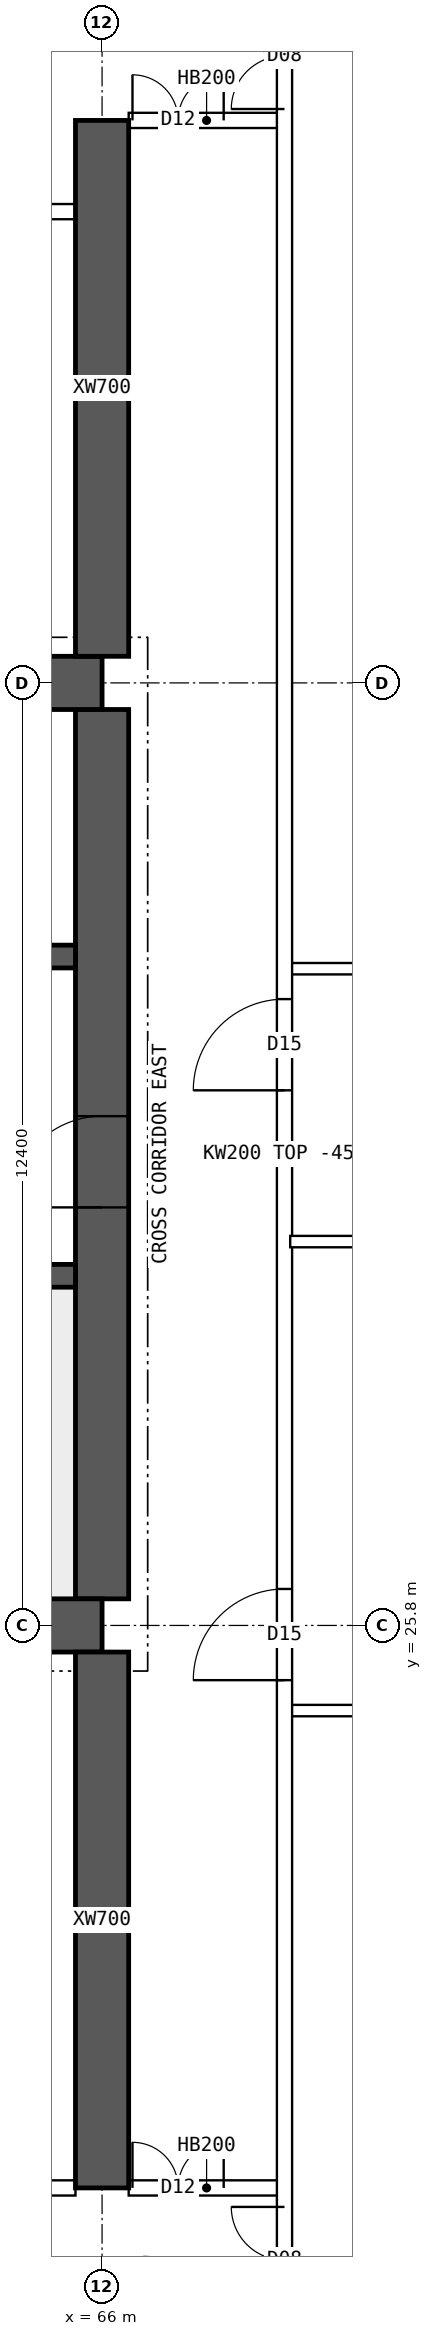
"""IFC4 building model, lengths in metres.
Left out: names, types, materials, properties, quantities, classifications, styles, units other than length and angle.
Written with IfcOpenShell. Run it as: python <this file> out.ifc"""

import sys

from ifc_helpers import new_model, si_unit, direction, frame, frame_2d, origin, place, context, subcontext, project, spatial, polyline, rectangle, outline, extrude, element, fill, save


model = new_model("IFC4")
c1 = context("Model", 3, precision=1e-05, world=origin(), true_north=direction((0.0, 1.0)))
c2 = subcontext(c1, "Body", "Model", "MODEL_VIEW")
j1 = project(units=[si_unit("LENGTHUNIT", "METRE"), si_unit("PLANEANGLEUNIT", "RADIAN")], contexts=[c1])
p1 = place(None, origin())
s1 = spatial("IfcSite", under=j1, at=p1, CompositionType="ELEMENT")
p2 = place(p1, origin())
s2 = spatial("IfcBuilding", under=s1, at=p2, CompositionType="ELEMENT")
p3 = place(p2, frame((0.0, 0.0, 227.8)))
s3 = spatial("IfcBuildingStorey", under=s2, at=p3, CompositionType="ELEMENT", Elevation=227.8)
for number, where, z_axis, x_axis in (
    (1, (18.0, 25.8, 0.0), (0.0, 0.0, 1.0), (1.0, 0.0, 0.0)),
    (2, (18.0, 38.2, 0.0), (0.0, 0.0, 1.0), (1.0, 0.0, 0.0)),
):
    element("IfcWall", number, at=place(p3, frame(where, z_axis=z_axis, x_axis=x_axis)), inside=s3, PredefinedType="SHEAR", context=c2, shape_type="SweptSolid", body=[
        extrude(rectangle(XDim=48.0, YDim=0.7, at=frame_2d((24.0, 0.0))), origin(), (0.0, 0.0, 1.0), 3.75),
    ])
p4 = place(p3, frame((66.0, 26.15, 0.0), z_axis=(0.0, 0.0, 1.0), x_axis=(0.0, 1.0, 0.0)))
e3 = element("IfcWall", 3, at=p4, inside=s3, PredefinedType="SHEAR", context=c2, shape_type="SweptSolid", body=[
    extrude(rectangle(XDim=11.7, YDim=0.7, at=frame_2d((5.85, 0.0))), origin(), (0.0, 0.0, 1.0), 3.75),
])
p5 = place(p4, frame((5.15, 0.0, 0.0)))
e4 = element("IfcOpeningElement", 4, at=p5, cuts=e3, PredefinedType="OPENING", context=c2, shape_type="SweptSolid", body=[
    extrude(rectangle(XDim=1.2, YDim=2.1, at=frame_2d((0.6, 1.05))), frame((0.0, 0.36, 0.0), z_axis=(0.0, -1.0, 0.0), x_axis=(1.0, 0.0, 0.0)), (0.0, 0.0, 1.0), 0.72),
])
p6 = place(p3, frame((18.35, 30.4, 0.0), z_axis=(0.0, 0.0, 1.0), x_axis=(1.0, 0.0, 0.0)))
e5 = element("IfcWall", 5, at=p6, inside=s3, PredefinedType="SHEAR", context=c2, shape_type="SweptSolid", body=[
    extrude(rectangle(XDim=47.3, YDim=0.3, at=frame_2d((23.65, 0.0))), origin(), (0.0, 0.0, 1.0), 3.75),
])
p7 = place(p6, frame((0.4, 0.0, 0.0)))
e6 = element("IfcOpeningElement", 6, at=p7, cuts=e5, PredefinedType="OPENING", context=c2, shape_type="SweptSolid", body=[
    extrude(rectangle(XDim=1.0, YDim=2.1, at=frame_2d((0.5, 1.05))), frame((0.0, 0.16, 0.0), z_axis=(0.0, -1.0, 0.0), x_axis=(1.0, 0.0, 0.0)), (0.0, 0.0, 1.0), 0.32),
])
p8 = place(p6, frame((45.9, 0.0, 0.0)))
e7 = element("IfcOpeningElement", 7, at=p8, cuts=e5, PredefinedType="OPENING", context=c2, shape_type="SweptSolid", body=[
    extrude(rectangle(XDim=1.0, YDim=2.1, at=frame_2d((0.5, 1.05))), frame((0.0, 0.16, 0.0), z_axis=(0.0, -1.0, 0.0), x_axis=(1.0, 0.0, 0.0)), (0.0, 0.0, 1.0), 0.32),
])
p9 = place(p6, frame((8.4, 0.0, 0.0)))
e8 = element("IfcOpeningElement", 8, at=p9, cuts=e5, PredefinedType="OPENING", context=c2, shape_type="SweptSolid", body=[
    extrude(rectangle(XDim=1.1, YDim=2.1, at=frame_2d((0.55, 1.05))), frame((0.0, 0.16, 0.0), z_axis=(0.0, -1.0, 0.0), x_axis=(1.0, 0.0, 0.0)), (0.0, 0.0, 1.0), 0.32),
])
p10 = place(p6, frame((11.0, 0.0, 0.0)))
e9 = element("IfcOpeningElement", 9, at=p10, cuts=e5, PredefinedType="OPENING", context=c2, shape_type="SweptSolid", body=[
    extrude(rectangle(XDim=1.1, YDim=2.1, at=frame_2d((0.55, 1.05))), frame((0.0, 0.16, 0.0), z_axis=(0.0, -1.0, 0.0), x_axis=(1.0, 0.0, 0.0)), (0.0, 0.0, 1.0), 0.32),
])
p11 = place(p6, frame((13.6, 0.0, 0.0)))
e10 = element("IfcOpeningElement", 10, at=p11, cuts=e5, PredefinedType="OPENING", context=c2, shape_type="SweptSolid", body=[
    extrude(rectangle(XDim=1.1, YDim=2.1, at=frame_2d((0.55, 1.05))), frame((0.0, 0.16, 0.0), z_axis=(0.0, -1.0, 0.0), x_axis=(1.0, 0.0, 0.0)), (0.0, 0.0, 1.0), 0.32),
])
p12 = place(p6, frame((16.2, 0.0, 0.0)))
e11 = element("IfcOpeningElement", 11, at=p12, cuts=e5, PredefinedType="OPENING", context=c2, shape_type="SweptSolid", body=[
    extrude(rectangle(XDim=1.1, YDim=2.1, at=frame_2d((0.55, 1.05))), frame((0.0, 0.16, 0.0), z_axis=(0.0, -1.0, 0.0), x_axis=(1.0, 0.0, 0.0)), (0.0, 0.0, 1.0), 0.32),
])
p13 = place(p6, frame((18.975, 0.0, 0.0)))
e12 = element("IfcOpeningElement", 12, at=p13, cuts=e5, PredefinedType="OPENING", context=c2, shape_type="SweptSolid", body=[
    extrude(rectangle(XDim=0.9, YDim=2.1, at=frame_2d((0.45, 1.05))), frame((0.0, 0.16, 0.0), z_axis=(0.0, -1.0, 0.0), x_axis=(1.0, 0.0, 0.0)), (0.0, 0.0, 1.0), 0.32),
])
p14 = place(p6, frame((24.475, 0.0, 0.0)))
e13 = element("IfcOpeningElement", 13, at=p14, cuts=e5, PredefinedType="OPENING", context=c2, shape_type="SweptSolid", body=[
    extrude(rectangle(XDim=0.9, YDim=2.1, at=frame_2d((0.45, 1.05))), frame((0.0, 0.16, 0.0), z_axis=(0.0, -1.0, 0.0), x_axis=(1.0, 0.0, 0.0)), (0.0, 0.0, 1.0), 0.32),
])
p15 = place(p6, frame((30.267, 0.0, 0.0)))
e14 = element("IfcOpeningElement", 14, at=p15, cuts=e5, PredefinedType="OPENING", context=c2, shape_type="SweptSolid", body=[
    extrude(rectangle(XDim=1.1, YDim=2.1, at=frame_2d((0.55, 1.05))), frame((0.0, 0.16, 0.0), z_axis=(0.0, -1.0, 0.0), x_axis=(1.0, 0.0, 0.0)), (0.0, 0.0, 1.0), 0.32),
])
p16 = place(p6, frame((33.8, 0.0, 0.0)))
e15 = element("IfcOpeningElement", 15, at=p16, cuts=e5, PredefinedType="OPENING", context=c2, shape_type="SweptSolid", body=[
    extrude(rectangle(XDim=1.1, YDim=2.1, at=frame_2d((0.55, 1.05))), frame((0.0, 0.16, 0.0), z_axis=(0.0, -1.0, 0.0), x_axis=(1.0, 0.0, 0.0)), (0.0, 0.0, 1.0), 0.32),
])
p17 = place(p6, frame((37.333, 0.0, 0.0)))
e16 = element("IfcOpeningElement", 16, at=p17, cuts=e5, PredefinedType="OPENING", context=c2, shape_type="SweptSolid", body=[
    extrude(rectangle(XDim=1.1, YDim=2.1, at=frame_2d((0.55, 1.05))), frame((0.0, 0.16, 0.0), z_axis=(0.0, -1.0, 0.0), x_axis=(1.0, 0.0, 0.0)), (0.0, 0.0, 1.0), 0.32),
])
p18 = place(p3, frame((18.35, 34.6, 0.0), z_axis=(0.0, 0.0, 1.0), x_axis=(1.0, 0.0, 0.0)))
e17 = element("IfcWall", 17, at=p18, inside=s3, PredefinedType="SHEAR", context=c2, shape_type="SweptSolid", body=[
    extrude(rectangle(XDim=47.3, YDim=0.3, at=frame_2d((23.65, 0.0))), origin(), (0.0, 0.0, 1.0), 3.75),
])
p19 = place(p18, frame((0.9, 0.0, 0.0)))
e18 = element("IfcOpeningElement", 18, at=p19, cuts=e17, PredefinedType="OPENING", context=c2, shape_type="SweptSolid", body=[
    extrude(rectangle(XDim=1.1, YDim=2.1, at=frame_2d((0.55, 1.05))), frame((0.0, 0.16, 0.0), z_axis=(0.0, -1.0, 0.0), x_axis=(1.0, 0.0, 0.0)), (0.0, 0.0, 1.0), 0.32),
])
p20 = place(p18, frame((45.3, 0.0, 0.0)))
e19 = element("IfcOpeningElement", 19, at=p20, cuts=e17, PredefinedType="OPENING", context=c2, shape_type="SweptSolid", body=[
    extrude(rectangle(XDim=1.1, YDim=2.1, at=frame_2d((0.55, 1.05))), frame((0.0, 0.16, 0.0), z_axis=(0.0, -1.0, 0.0), x_axis=(1.0, 0.0, 0.0)), (0.0, 0.0, 1.0), 0.32),
])
p21 = place(p18, frame((4.25, 0.0, 0.0)))
e20 = element("IfcOpeningElement", 20, at=p21, cuts=e17, PredefinedType="OPENING", context=c2, shape_type="SweptSolid", body=[
    extrude(rectangle(XDim=0.9, YDim=2.1, at=frame_2d((0.45, 1.05))), frame((0.0, 0.16, 0.0), z_axis=(0.0, -1.0, 0.0), x_axis=(1.0, 0.0, 0.0)), (0.0, 0.0, 1.0), 0.32),
])
p22 = place(p18, frame((42.15, 0.0, 0.0)))
e21 = element("IfcOpeningElement", 21, at=p22, cuts=e17, PredefinedType="OPENING", context=c2, shape_type="SweptSolid", body=[
    extrude(rectangle(XDim=0.9, YDim=2.1, at=frame_2d((0.45, 1.05))), frame((0.0, 0.16, 0.0), z_axis=(0.0, -1.0, 0.0), x_axis=(1.0, 0.0, 0.0)), (0.0, 0.0, 1.0), 0.32),
])
p23 = place(p18, frame((9.025, 0.0, 0.0)))
e22 = element("IfcOpeningElement", 22, at=p23, cuts=e17, PredefinedType="OPENING", context=c2, shape_type="SweptSolid", body=[
    extrude(rectangle(XDim=0.9, YDim=2.1, at=frame_2d((0.45, 1.05))), frame((0.0, 0.16, 0.0), z_axis=(0.0, -1.0, 0.0), x_axis=(1.0, 0.0, 0.0)), (0.0, 0.0, 1.0), 0.32),
])
p24 = place(p18, frame((12.999, 0.0, 0.0)))
e23 = element("IfcOpeningElement", 23, at=p24, cuts=e17, PredefinedType="OPENING", context=c2, shape_type="SweptSolid", body=[
    extrude(rectangle(XDim=0.9, YDim=2.1, at=frame_2d((0.45, 1.05))), frame((0.0, 0.16, 0.0), z_axis=(0.0, -1.0, 0.0), x_axis=(1.0, 0.0, 0.0)), (0.0, 0.0, 1.0), 0.32),
])
p25 = place(p18, frame((16.646, 0.0, 0.0)))
e24 = element("IfcOpeningElement", 24, at=p25, cuts=e17, PredefinedType="OPENING", context=c2, shape_type="SweptSolid", body=[
    extrude(rectangle(XDim=0.9, YDim=2.1, at=frame_2d((0.45, 1.05))), frame((0.0, 0.16, 0.0), z_axis=(0.0, -1.0, 0.0), x_axis=(1.0, 0.0, 0.0)), (0.0, 0.0, 1.0), 0.32),
])
p26 = place(p18, frame((20.405, 0.0, 0.0)))
e25 = element("IfcOpeningElement", 25, at=p26, cuts=e17, PredefinedType="OPENING", context=c2, shape_type="SweptSolid", body=[
    extrude(rectangle(XDim=0.9, YDim=2.1, at=frame_2d((0.45, 1.05))), frame((0.0, 0.16, 0.0), z_axis=(0.0, -1.0, 0.0), x_axis=(1.0, 0.0, 0.0)), (0.0, 0.0, 1.0), 0.32),
])
p27 = place(p18, frame((24.811, 0.0, 0.0)))
e26 = element("IfcOpeningElement", 26, at=p27, cuts=e17, PredefinedType="OPENING", context=c2, shape_type="SweptSolid", body=[
    extrude(rectangle(XDim=0.9, YDim=2.1, at=frame_2d((0.45, 1.05))), frame((0.0, 0.16, 0.0), z_axis=(0.0, -1.0, 0.0), x_axis=(1.0, 0.0, 0.0)), (0.0, 0.0, 1.0), 0.32),
])
p28 = place(p18, frame((27.608, 0.0, 0.0)))
e27 = element("IfcOpeningElement", 27, at=p28, cuts=e17, PredefinedType="OPENING", context=c2, shape_type="SweptSolid", body=[
    extrude(rectangle(XDim=0.9, YDim=2.1, at=frame_2d((0.45, 1.05))), frame((0.0, 0.16, 0.0), z_axis=(0.0, -1.0, 0.0), x_axis=(1.0, 0.0, 0.0)), (0.0, 0.0, 1.0), 0.32),
])
p29 = place(p18, frame((33.729, 0.0, 0.0)))
e28 = element("IfcOpeningElement", 28, at=p29, cuts=e17, PredefinedType="OPENING", context=c2, shape_type="SweptSolid", body=[
    extrude(rectangle(XDim=0.9, YDim=2.1, at=frame_2d((0.45, 1.05))), frame((0.0, 0.16, 0.0), z_axis=(0.0, -1.0, 0.0), x_axis=(1.0, 0.0, 0.0)), (0.0, 0.0, 1.0), 0.32),
])
for number, where, z_axis, x_axis in (
    (29, (66.0, 18.4, 0.0), (0.0, 0.0, 1.0), (0.0, 1.0, 0.0)),
    (30, (66.0, 38.55, 0.0), (0.0, 0.0, 1.0), (0.0, 1.0, 0.0)),
):
    element("IfcWall", number, at=place(p3, frame(where, z_axis=z_axis, x_axis=x_axis)), inside=s3, PredefinedType="SHEAR", context=c2, shape_type="SweptSolid", body=[
        extrude(rectangle(XDim=7.05, YDim=0.7, at=frame_2d((3.525, 0.0))), origin(), (0.0, 0.0, 1.0), 3.75),
    ])
p30 = place(p3, frame((60.35, 18.4, 0.0), z_axis=(0.0, 0.0, 1.0), x_axis=(1.0, 0.0, 0.0)))
e31 = element("IfcWall", 31, at=p30, inside=s3, PredefinedType="SOLIDWALL", context=c2, shape_type="SweptSolid", body=[
    extrude(rectangle(XDim=5.3, YDim=0.2, at=frame_2d((2.65, 0.0))), origin(), (0.0, 0.0, 1.0), 3.3),
])
p31 = place(p30, frame((0.15, 0.0, 0.0)))
e32 = element("IfcOpeningElement", 32, at=p31, cuts=e31, PredefinedType="OPENING", context=c2, shape_type="SweptSolid", body=[
    extrude(rectangle(XDim=0.9, YDim=2.1, at=frame_2d((0.45, 1.05))), frame((0.0, 0.11, 0.0), z_axis=(0.0, -1.0, 0.0), x_axis=(1.0, 0.0, 0.0)), (0.0, 0.0, 1.0), 0.22),
])
p32 = place(p30, frame((2.15, 0.0, 0.0)))
e33 = element("IfcOpeningElement", 33, at=p32, cuts=e31, PredefinedType="OPENING", context=c2, shape_type="SweptSolid", body=[
    extrude(rectangle(XDim=0.9, YDim=2.1, at=frame_2d((0.45, 1.05))), frame((0.0, 0.11, 0.0), z_axis=(0.0, -1.0, 0.0), x_axis=(1.0, 0.0, 0.0)), (0.0, 0.0, 1.0), 0.22),
])
p33 = place(p3, frame((66.35, 18.4, 0.0), z_axis=(0.0, 0.0, 1.0), x_axis=(1.0, 0.0, 0.0)))
e34 = element("IfcWall", 34, at=p33, inside=s3, PredefinedType="SOLIDWALL", context=c2, shape_type="SweptSolid", body=[
    extrude(rectangle(XDim=2.05, YDim=0.2, at=frame_2d((1.025, 0.0))), origin(), (0.0, 0.0, 1.0), 3.3),
])
p34 = place(p33, frame((0.05, 0.0, 0.0)))
e35 = element("IfcOpeningElement", 35, at=p34, cuts=e34, PredefinedType="OPENING", context=c2, shape_type="SweptSolid", body=[
    extrude(rectangle(XDim=1.2, YDim=2.1, at=frame_2d((0.6, 1.05))), frame((0.0, 0.11, 0.0), z_axis=(0.0, -1.0, 0.0), x_axis=(1.0, 0.0, 0.0)), (0.0, 0.0, 1.0), 0.22),
])
p35 = place(p3, frame((66.35, 45.6, 0.0), z_axis=(0.0, 0.0, 1.0), x_axis=(1.0, 0.0, 0.0)))
e36 = element("IfcWall", 36, at=p35, inside=s3, PredefinedType="SOLIDWALL", context=c2, shape_type="SweptSolid", body=[
    extrude(rectangle(XDim=2.05, YDim=0.2, at=frame_2d((1.025, 0.0))), origin(), (0.0, 0.0, 1.0), 3.3),
])
p36 = place(p35, frame((0.05, 0.0, 0.0)))
e37 = element("IfcOpeningElement", 37, at=p36, cuts=e36, PredefinedType="OPENING", context=c2, shape_type="SweptSolid", body=[
    extrude(rectangle(XDim=1.2, YDim=2.1, at=frame_2d((0.6, 1.05))), frame((0.0, 0.11, 0.0), z_axis=(0.0, -1.0, 0.0), x_axis=(1.0, 0.0, 0.0)), (0.0, 0.0, 1.0), 0.22),
])
p37 = place(p3, frame((60.35, 44.4, 0.0), z_axis=(0.0, 0.0, 1.0), x_axis=(1.0, 0.0, 0.0)))
e38 = element("IfcWall", 38, at=p37, inside=s3, PredefinedType="SOLIDWALL", context=c2, shape_type="SweptSolid", body=[
    extrude(rectangle(XDim=5.3, YDim=0.2, at=frame_2d((2.65, 0.0))), origin(), (0.0, 0.0, 1.0), 3.3),
])
p38 = place(p37, frame((0.525, 0.0, 0.0)))
e39 = element("IfcOpeningElement", 39, at=p38, cuts=e38, PredefinedType="OPENING", context=c2, shape_type="SweptSolid", body=[
    extrude(rectangle(XDim=1.0, YDim=2.1, at=frame_2d((0.5, 1.05))), frame((0.0, 0.11, 0.0), z_axis=(0.0, -1.0, 0.0), x_axis=(1.0, 0.0, 0.0)), (0.0, 0.0, 1.0), 0.22),
])
p39 = place(p3, frame((68.475, 30.85, 0.0), z_axis=(0.0, 0.0, 1.0), x_axis=(1.0, 0.0, 0.0)))
e40 = element("IfcWall", 40, at=p39, inside=s3, PredefinedType="PARTITIONING", context=c2, shape_type="SweptSolid", body=[
    extrude(outline(polyline([(0.0, 0.0), (6.82, 0.0), (6.82, 3.3), (3.827, 3.3), (3.825, 2.85), (3.227, 2.85), (3.225, 3.3), (0.0, 3.3), (0.0, 0.0)])), frame((0.0, 0.075, 0.0), z_axis=(0.0, -1.0, 0.0), x_axis=(1.0, 0.0, 0.0)), (0.0, 0.0, 1.0), 0.15),
])
p40 = place(p3, frame((68.4, 11.646, 0.0), z_axis=(0.0, 0.0, 1.0), x_axis=(0.0, 1.0, 0.0)))
e41 = element("IfcWall", 41, at=p40, inside=s3, PredefinedType="SOLIDWALL", context=c2, shape_type="SweptSolid", body=[
    extrude(rectangle(XDim=40.708, YDim=0.2, at=frame_2d((20.354, 0.0))), origin(), (0.0, 0.0, 1.0), 3.3),
])
p41 = place(p40, frame((13.434, 0.0, 0.0)))
e42 = element("IfcOpeningElement", 42, at=p41, cuts=e41, PredefinedType="OPENING", context=c2, shape_type="SweptSolid", body=[
    extrude(rectangle(XDim=1.2, YDim=2.1, at=frame_2d((0.6, 1.05))), frame((0.0, 0.11, 0.0), z_axis=(0.0, -1.0, 0.0), x_axis=(1.0, 0.0, 0.0)), (0.0, 0.0, 1.0), 0.22),
])
p42 = place(p40, frame((21.194, 0.0, 0.0)))
e43 = element("IfcOpeningElement", 43, at=p42, cuts=e41, PredefinedType="OPENING", context=c2, shape_type="SweptSolid", body=[
    extrude(rectangle(XDim=1.2, YDim=2.1, at=frame_2d((0.6, 1.05))), frame((0.0, 0.11, 0.0), z_axis=(0.0, -1.0, 0.0), x_axis=(1.0, 0.0, 0.0)), (0.0, 0.0, 1.0), 0.22),
])
p43 = place(p40, frame((5.104, 0.0, 0.0)))
e44 = element("IfcOpeningElement", 44, at=p43, cuts=e41, PredefinedType="OPENING", context=c2, shape_type="SweptSolid", body=[
    extrude(rectangle(XDim=1.4, YDim=2.1, at=frame_2d((0.7, 1.05))), frame((0.0, 0.11, 0.0), z_axis=(0.0, -1.0, 0.0), x_axis=(1.0, 0.0, 0.0)), (0.0, 0.0, 1.0), 0.22),
])
p44 = place(p40, frame((34.104, 0.0, 0.0)))
e45 = element("IfcOpeningElement", 45, at=p44, cuts=e41, PredefinedType="OPENING", context=c2, shape_type="SweptSolid", body=[
    extrude(rectangle(XDim=1.4, YDim=2.1, at=frame_2d((0.7, 1.05))), frame((0.0, 0.11, 0.0), z_axis=(0.0, -1.0, 0.0), x_axis=(1.0, 0.0, 0.0)), (0.0, 0.0, 1.0), 0.22),
])
p45 = place(p3, frame((68.475, 24.68, 0.0), z_axis=(0.0, 0.0, 1.0), x_axis=(1.0, 0.0, 0.0)))
e46 = element("IfcWall", 46, at=p45, inside=s3, PredefinedType="PARTITIONING", context=c2, shape_type="SweptSolid", body=[
    extrude(rectangle(XDim=6.82, YDim=0.15, at=frame_2d((3.41, 0.0))), origin(), (0.0, 0.0, 1.0), 3.3),
])
p46 = place(p3, frame((68.475, 34.44, 0.0), z_axis=(0.0, 0.0, 1.0), x_axis=(1.0, 0.0, 0.0)))
e47 = element("IfcWall", 47, at=p46, inside=s3, PredefinedType="PARTITIONING", context=c2, shape_type="SweptSolid", body=[
    extrude(outline(polyline([(0.0, 0.0), (6.82, 0.0), (6.82, 3.3), (3.827, 3.3), (3.825, 2.85), (3.227, 2.85), (3.225, 3.3), (0.0, 3.3), (0.0, 0.0)])), frame((0.0, 0.075, 0.0), z_axis=(0.0, -1.0, 0.0), x_axis=(1.0, 0.0, 0.0)), (0.0, 0.0, 1.0), 0.15),
])
p47 = place(p5, origin())
e48 = element("IfcDoor", 48, at=p47, inside=s3, OperationType="SINGLE_SWING_LEFT", PredefinedType="DOOR", context=c2, shape_type="SweptSolid", body=[
    extrude(rectangle(XDim=1.2, YDim=2.1, at=frame_2d((0.6, 1.05))), frame((0.0, 0.025, 0.0), z_axis=(0.0, -1.0, 0.0), x_axis=(1.0, 0.0, 0.0)), (0.0, 0.0, 1.0), 0.05),
])
fill(e4, e48)
p48 = place(p34, origin())
e49 = element("IfcDoor", 49, at=p48, inside=s3, OperationType="DOUBLE_DOOR_SINGLE_SWING", PredefinedType="DOOR", context=c2, shape_type="SweptSolid", body=[
    extrude(rectangle(XDim=1.2, YDim=2.1, at=frame_2d((0.6, 1.05))), frame((0.0, 0.025, 0.0), z_axis=(0.0, -1.0, 0.0), x_axis=(1.0, 0.0, 0.0)), (0.0, 0.0, 1.0), 0.05),
])
fill(e35, e49)
p49 = place(p36, origin())
e50 = element("IfcDoor", 50, at=p49, inside=s3, OperationType="DOUBLE_DOOR_SINGLE_SWING", PredefinedType="DOOR", context=c2, shape_type="SweptSolid", body=[
    extrude(rectangle(XDim=1.2, YDim=2.1, at=frame_2d((0.6, 1.05))), frame((0.0, 0.025, 0.0), z_axis=(0.0, -1.0, 0.0), x_axis=(1.0, 0.0, 0.0)), (0.0, 0.0, 1.0), 0.05),
])
fill(e37, e50)
p50 = place(p41, origin())
e51 = element("IfcDoor", 51, at=p50, inside=s3, OperationType="SINGLE_SWING_LEFT", PredefinedType="DOOR", context=c2, shape_type="SweptSolid", body=[
    extrude(rectangle(XDim=1.2, YDim=2.1, at=frame_2d((0.6, 1.05))), frame((0.0, 0.025, 0.0), z_axis=(0.0, -1.0, 0.0), x_axis=(1.0, 0.0, 0.0)), (0.0, 0.0, 1.0), 0.05),
])
fill(e42, e51)
p51 = place(p42, origin())
e52 = element("IfcDoor", 52, at=p51, inside=s3, OperationType="SINGLE_SWING_LEFT", PredefinedType="DOOR", context=c2, shape_type="SweptSolid", body=[
    extrude(rectangle(XDim=1.2, YDim=2.1, at=frame_2d((0.6, 1.05))), frame((0.0, 0.025, 0.0), z_axis=(0.0, -1.0, 0.0), x_axis=(1.0, 0.0, 0.0)), (0.0, 0.0, 1.0), 0.05),
])
fill(e43, e52)
p52 = place(p43, origin())
e53 = element("IfcDoor", 53, at=p52, inside=s3, OperationType="DOUBLE_DOOR_SINGLE_SWING", PredefinedType="DOOR", context=c2, shape_type="SweptSolid", body=[
    extrude(rectangle(XDim=1.4, YDim=2.1, at=frame_2d((0.7, 1.05))), frame((0.0, 0.025, 0.0), z_axis=(0.0, -1.0, 0.0), x_axis=(1.0, 0.0, 0.0)), (0.0, 0.0, 1.0), 0.05),
])
fill(e44, e53)
p53 = place(p44, origin())
e54 = element("IfcDoor", 54, at=p53, inside=s3, OperationType="DOUBLE_DOOR_SINGLE_SWING", PredefinedType="DOOR", context=c2, shape_type="SweptSolid", body=[
    extrude(rectangle(XDim=1.4, YDim=2.1, at=frame_2d((0.7, 1.05))), frame((0.0, 0.025, 0.0), z_axis=(0.0, -1.0, 0.0), x_axis=(1.0, 0.0, 0.0)), (0.0, 0.0, 1.0), 0.05),
])
fill(e45, e54)
save(model, sys.argv[1])
